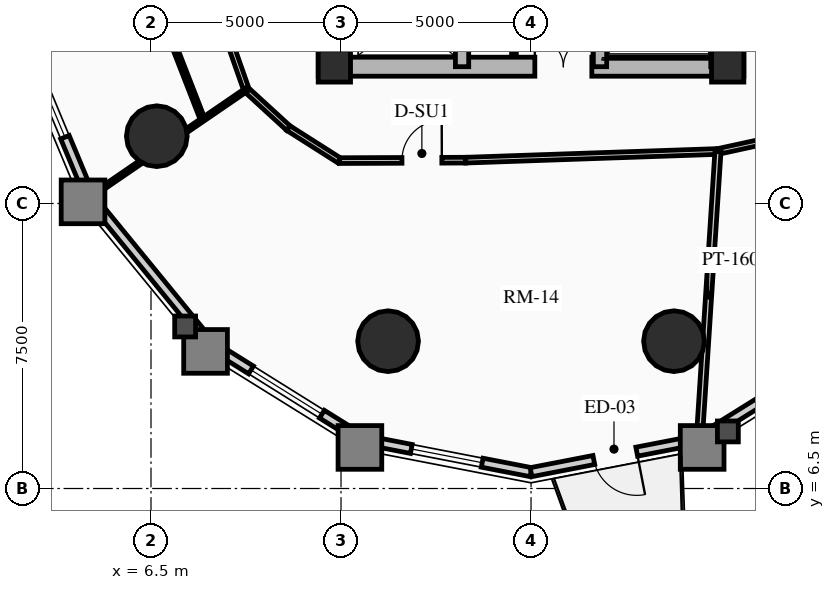
"""IFC4 building model, lengths in metres.
Left out: names, types, materials, properties, quantities, classifications, styles, units other than length and angle.
Written with IfcOpenShell. Run it as: python <this file> out.ifc"""

import sys

from ifc_helpers import new_model, si_unit, direction, frame, frame_2d, origin, origin_2d, place, context, subcontext, project, spatial, rectangle, circle, extrude, source, transform, mapped, element, fill, save


model = new_model("IFC4")
c1 = context("Model", 3, precision=1e-05, world=origin(), true_north=direction((0.0, 1.0)))
c2 = subcontext(c1, "Body", "Model", "MODEL_VIEW")
j1 = project(units=[si_unit("LENGTHUNIT", "METRE"), si_unit("PLANEANGLEUNIT", "RADIAN")], contexts=[c1])
p1 = place(None, origin())
s1 = spatial("IfcSite", under=j1, at=p1, CompositionType="ELEMENT")
p2 = place(p1, origin())
s2 = spatial("IfcBuilding", under=s1, at=p2, CompositionType="ELEMENT")
p3 = place(p2, frame((0.0, 0.0, 22.0)))
s3 = spatial("IfcBuildingStorey", under=s2, at=p3, CompositionType="ELEMENT", Elevation=22.0)
for number, where, z_axis, x_axis in (
    (1, (11.15, 17.35, 0.0), (0.0, 0.0, 1.0), (0.0, 1.0, 0.0)),
    (2, (21.85, 17.35, 0.0), (0.0, 0.0, 1.0), (0.0, 1.0, 0.0)),
):
    element("IfcWall", number, at=place(p3, frame(where, z_axis=z_axis, x_axis=x_axis)), inside=s3, PredefinedType="SHEAR", context=c2, shape_type="SweptSolid", body=[
        extrude(rectangle(XDim=14.3, YDim=0.5, at=frame_2d((7.15, 0.0))), origin(), (0.0, 0.0, 1.0), 2.91),
    ])
p4 = place(p3, frame((11.15, 17.6, 0.0), z_axis=(0.0, 0.0, 1.0), x_axis=(1.0, 0.0, 0.0)))
e3 = element("IfcWall", 3, at=p4, inside=s3, PredefinedType="SHEAR", context=c2, shape_type="SweptSolid", body=[
    extrude(rectangle(XDim=10.7, YDim=0.5, at=frame_2d((5.35, 0.0))), origin(), (0.0, 0.0, 1.0), 2.91),
])
m1 = source(origin(), c2, "Body", "SweptSolid", [
    extrude(rectangle(XDim=1.5, YDim=2.02, at=frame_2d((0.75, 1.01))), frame((0.0, 0.26, 0.0), z_axis=(0.0, -1.0, 0.0), x_axis=(1.0, 0.0, 0.0)), (0.0, 0.0, 1.0), 0.52),
])
p5 = place(p4, frame((5.45, 0.0, 0.0)))
e4 = element("IfcOpeningElement", 4, at=p5, cuts=e3, PredefinedType="OPENING", context=c2, shape_type="MappedRepresentation", body=[
    mapped(m1, transform((0.0, 0.0, 0.0), x_axis=(1.0, 0.0, 0.0), y_axis=(0.0, 1.0, 0.0), z_axis=(0.0, 0.0, 1.0), scale=1.0)),
])
p6 = place(p3, frame((14.685, 17.6, 0.0), z_axis=(0.0, 0.0, 1.0), x_axis=(0.0, 1.0, 0.0)))
e5 = element("IfcWall", 5, at=p6, inside=s3, PredefinedType="SHEAR", context=c2, shape_type="SweptSolid", body=[
    extrude(rectangle(XDim=13.8, YDim=0.35, at=frame_2d((6.9, 0.0))), origin(), (0.0, 0.0, 1.0), 2.91),
])
m2 = source(origin(), c2, "Body", "SweptSolid", [
    extrude(rectangle(XDim=1.1, YDim=2.015, at=frame_2d((0.55, 1.007))), frame((0.0, 0.185, 0.0), z_axis=(0.0, -1.0, 0.0), x_axis=(1.0, 0.0, 0.0)), (0.0, 0.0, 1.0), 0.37),
])
p7 = place(p6, frame((4.9, 0.0, 0.0)))
e6 = element("IfcOpeningElement", 6, at=p7, cuts=e5, PredefinedType="OPENING", context=c2, shape_type="MappedRepresentation", body=[
    mapped(m2, transform((0.0, 0.0, 0.0), x_axis=(1.0, 0.0, 0.0), y_axis=(0.0, 1.0, 0.0), z_axis=(0.0, 0.0, 1.0), scale=1.0)),
])
m3 = source(origin(), c2, "Body", "SweptSolid", [
    extrude(rectangle(XDim=1.15, YDim=2.02, at=frame_2d((0.575, 1.01))), frame((0.0, 0.185, 0.0), z_axis=(0.0, -1.0, 0.0), x_axis=(1.0, 0.0, 0.0)), (0.0, 0.0, 1.0), 0.37),
])
p8 = place(p6, frame((7.32, 0.0, 0.0)))
e7 = element("IfcOpeningElement", 7, at=p8, cuts=e5, PredefinedType="OPENING", context=c2, shape_type="MappedRepresentation", body=[
    mapped(m3, transform((0.0, 0.0, 0.0), x_axis=(1.0, 0.0, 0.0), y_axis=(0.0, 1.0, 0.0), z_axis=(0.0, 0.0, 1.0), scale=1.0)),
])
p9 = place(p3, frame((18.315, 17.6, 0.0), z_axis=(0.0, 0.0, 1.0), x_axis=(0.0, 1.0, 0.0)))
e8 = element("IfcWall", 8, at=p9, inside=s3, PredefinedType="SHEAR", context=c2, shape_type="SweptSolid", body=[
    extrude(rectangle(XDim=13.8, YDim=0.35, at=frame_2d((6.9, 0.0))), origin(), (0.0, 0.0, 1.0), 2.91),
])
p10 = place(p9, frame((10.025, 0.0, 0.0)))
e9 = element("IfcOpeningElement", 9, at=p10, cuts=e8, PredefinedType="OPENING", context=c2, shape_type="MappedRepresentation", body=[
    mapped(m2, transform((0.0, 0.0, 0.0), x_axis=(1.0, 0.0, 0.0), y_axis=(0.0, 1.0, 0.0), z_axis=(0.0, 0.0, 1.0), scale=1.0)),
])
p11 = place(p9, frame((12.025, 0.0, 0.0)))
e10 = element("IfcOpeningElement", 10, at=p11, cuts=e8, PredefinedType="OPENING", context=c2, shape_type="MappedRepresentation", body=[
    mapped(m2, transform((0.0, 0.0, 0.0), x_axis=(1.0, 0.0, 0.0), y_axis=(0.0, 1.0, 0.0), z_axis=(0.0, 0.0, 1.0), scale=1.0)),
])
p12 = place(p9, frame((5.33, 0.0, 0.0)))
e11 = element("IfcOpeningElement", 11, at=p12, cuts=e8, PredefinedType="OPENING", context=c2, shape_type="MappedRepresentation", body=[
    mapped(m3, transform((0.0, 0.0, 0.0), x_axis=(1.0, 0.0, 0.0), y_axis=(0.0, 1.0, 0.0), z_axis=(0.0, 0.0, 1.0), scale=1.0)),
])
p13 = place(p3, frame((21.405, 17.6, 0.0), z_axis=(0.0, 0.0, 1.0), x_axis=(0.0, 1.0, 0.0)))
e12 = element("IfcWall", 12, at=p13, inside=s3, PredefinedType="SHEAR", context=c2, shape_type="SweptSolid", body=[
    extrude(rectangle(XDim=6.745, YDim=0.35, at=frame_2d((3.373, 0.0))), origin(), (0.0, 0.0, 1.0), 2.91),
])
for number, where, z_axis, x_axis in (
    (13, (11.325, 17.62, 0.0), (0.0, 0.0, 1.0), (1.0, 0.0, 0.0)),
    (14, (21.675, 17.62, 0.0), (0.0, 0.0, 1.0), (1.0, 0.0, 0.0)),
):
    element("IfcColumn", number, at=place(p3, frame(where, z_axis=z_axis, x_axis=x_axis)), inside=s3, PredefinedType="COLUMN", context=c2, shape_type="SweptSolid", body=[
        extrude(rectangle(XDim=0.85, YDim=0.85, at=origin_2d()), origin(), (0.0, 0.0, 1.0), 2.91),
    ])
for number, where, z_axis, x_axis in (
    (15, (6.653, 15.771, 0.0), (0.0, 0.0, 1.0), (1.0, 0.0, 0.0)),
    (16, (12.739, 10.377, 0.0), (0.0, 0.0, 1.0), (1.0, 0.0, 0.0)),
    (17, (20.261, 10.377, 0.0), (0.0, 0.0, 1.0), (1.0, 0.0, 0.0)),
):
    element("IfcColumn", number, at=place(p3, frame(where, z_axis=z_axis, x_axis=x_axis)), inside=s3, PredefinedType="USERDEFINED", context=c2, shape_type="SweptSolid", body=[
        extrude(circle(Radius=0.8, at=origin_2d()), origin(), (0.0, 0.0, 1.0), 2.91),
    ])
p14 = place(p3, frame((4.89, 14.173, 0.0), z_axis=(0.0, 0.0, 1.0), x_axis=(-0.384255919668, 0.923226618009, 0.0)))
e18 = element("IfcWall", 18, at=p14, inside=s3, PredefinedType="SOLIDWALL", context=c2, shape_type="SweptSolid", body=[
    extrude(rectangle(XDim=5.305, YDim=0.24, at=frame_2d((2.653, 0.0))), origin(), (0.0, 0.0, 1.0), 2.073),
])
m4 = source(origin(), c2, "Body", "SweptSolid", [
    extrude(rectangle(XDim=1.9, YDim=1.35, at=frame_2d((0.95, 0.675))), frame((0.0, 0.13, 0.0), z_axis=(0.0, -1.0, 0.0), x_axis=(1.0, 0.0, 0.0)), (0.0, 0.0, 1.0), 0.26),
])
p15 = place(p14, frame((1.703, 0.0, 0.65)))
e19 = element("IfcOpeningElement", 19, at=p15, cuts=e18, PredefinedType="OPENING", context=c2, shape_type="MappedRepresentation", body=[
    mapped(m4, transform((0.0, 0.0, 0.0), x_axis=(1.0, 0.0, 0.0), y_axis=(0.0, 1.0, 0.0), z_axis=(0.0, 0.0, 1.0), scale=1.0)),
])
p16 = place(p3, frame((8.065, 10.286, 0.0), z_axis=(0.0, 0.0, 1.0), x_axis=(-0.632588557044, 0.774488035735, 0.0)))
e20 = element("IfcWall", 20, at=p16, inside=s3, PredefinedType="SOLIDWALL", context=c2, shape_type="SweptSolid", body=[
    extrude(rectangle(XDim=5.019, YDim=0.24, at=frame_2d((2.509, 0.0))), origin(), (0.0, 0.0, 1.0), 2.073),
])
p17 = place(p3, frame((12.065, 7.79, 0.0), z_axis=(0.0, 0.0, 1.0), x_axis=(-0.848422721916, 0.529319265601, 0.0)))
e21 = element("IfcWall", 21, at=p17, inside=s3, PredefinedType="SOLIDWALL", context=c2, shape_type="SweptSolid", body=[
    extrude(rectangle(XDim=4.715, YDim=0.24, at=frame_2d((2.357, 0.0))), origin(), (0.0, 0.0, 1.0), 2.073),
])
m5 = source(origin(), c2, "Body", "SweptSolid", [
    extrude(rectangle(XDim=2.2, YDim=1.35, at=frame_2d((1.1, 0.675))), frame((0.0, 0.13, 0.0), z_axis=(0.0, -1.0, 0.0), x_axis=(1.0, 0.0, 0.0)), (0.0, 0.0, 1.0), 0.26),
])
p18 = place(p17, frame((1.258, 0.0, 0.65)))
e22 = element("IfcOpeningElement", 22, at=p18, cuts=e21, PredefinedType="OPENING", context=c2, shape_type="MappedRepresentation", body=[
    mapped(m5, transform((0.0, 0.0, 0.0), x_axis=(1.0, 0.0, 0.0), y_axis=(0.0, 1.0, 0.0), z_axis=(0.0, 0.0, 1.0), scale=1.0)),
])
p19 = place(p3, frame((16.5, 6.93, 0.0), z_axis=(0.0, 0.0, 1.0), x_axis=(-0.981717351035, 0.190344536766, 0.0)))
e23 = element("IfcWall", 23, at=p19, inside=s3, PredefinedType="SOLIDWALL", context=c2, shape_type="SweptSolid", body=[
    extrude(rectangle(XDim=4.517, YDim=0.24, at=frame_2d((2.259, 0.0))), origin(), (0.0, 0.0, 1.0), 2.073),
])
p20 = place(p19, frame((1.309, 0.0, 0.65)))
e24 = element("IfcOpeningElement", 24, at=p20, cuts=e23, PredefinedType="OPENING", context=c2, shape_type="MappedRepresentation", body=[
    mapped(m4, transform((0.0, 0.0, 0.0), x_axis=(1.0, 0.0, 0.0), y_axis=(0.0, 1.0, 0.0), z_axis=(0.0, 0.0, 1.0), scale=1.0)),
])
p21 = place(p3, frame((20.935, 7.79, 0.0), z_axis=(0.0, 0.0, 1.0), x_axis=(-0.981717351035, -0.190344536766, 0.0)))
e25 = element("IfcWall", 25, at=p21, inside=s3, PredefinedType="SOLIDWALL", context=c2, shape_type="SweptSolid", body=[
    extrude(rectangle(XDim=4.517, YDim=0.24, at=frame_2d((2.259, 0.0))), origin(), (0.0, 0.0, 1.0), 2.073),
])
m6 = source(origin(), c2, "Body", "SweptSolid", [
    extrude(rectangle(XDim=1.15, YDim=2.005, at=frame_2d((0.575, 1.002))), frame((0.0, 0.13, 0.0), z_axis=(0.0, -1.0, 0.0), x_axis=(1.0, 0.0, 0.0)), (0.0, 0.0, 1.0), 0.26),
])
p22 = place(p21, frame((1.684, 0.0, 0.0)))
e26 = element("IfcOpeningElement", 26, at=p22, cuts=e25, PredefinedType="OPENING", context=c2, shape_type="MappedRepresentation", body=[
    mapped(m6, transform((0.0, 0.0, 0.0), x_axis=(1.0, 0.0, 0.0), y_axis=(0.0, 1.0, 0.0), z_axis=(0.0, 0.0, 1.0), scale=1.0)),
])
p23 = place(p3, frame((24.935, 10.286, 0.0), z_axis=(0.0, 0.0, 1.0), x_axis=(-0.848422721916, -0.529319265601, 0.0)))
e27 = element("IfcWall", 27, at=p23, inside=s3, PredefinedType="SOLIDWALL", context=c2, shape_type="SweptSolid", body=[
    extrude(rectangle(XDim=4.715, YDim=0.24, at=frame_2d((2.357, 0.0))), origin(), (0.0, 0.0, 1.0), 2.073),
])
p24 = place(p3, frame((16.05, 17.92, 0.0), z_axis=(0.0, 0.0, 1.0), x_axis=(0.0, 1.0, 0.0)))
e28 = element("IfcWall", 28, at=p24, inside=s3, PredefinedType="PARTITIONING", context=c2, shape_type="SweptSolid", body=[
    extrude(rectangle(XDim=1.8, YDim=0.125, at=frame_2d((0.9, 0.0))), origin(), (0.0, 0.0, 1.0), 2.635),
])
m7 = source(origin(), c2, "Body", "SweptSolid", [
    extrude(rectangle(XDim=0.9, YDim=2.005, at=frame_2d((0.45, 1.002))), frame((0.0, 0.073, 0.0), z_axis=(0.0, -1.0, 0.0), x_axis=(1.0, 0.0, 0.0)), (0.0, 0.0, 1.0), 0.145),
])
p25 = place(p24, frame((0.42, 0.0, 0.0)))
e29 = element("IfcOpeningElement", 29, at=p25, cuts=e28, PredefinedType="OPENING", context=c2, shape_type="MappedRepresentation", body=[
    mapped(m7, transform((0.0, 0.0, 0.0), x_axis=(1.0, 0.0, 0.0), y_axis=(0.0, 1.0, 0.0), z_axis=(0.0, 0.0, 1.0), scale=1.0)),
])
p26 = place(p3, frame((8.538, 18.338, 0.0), z_axis=(0.0, 0.0, 1.0), x_axis=(0.331358150167, -0.94350504838, 0.0)))
e30 = element("IfcWall", 30, at=p26, inside=s3, PredefinedType="PARTITIONING", context=c2, shape_type="SweptSolid", body=[
    extrude(rectangle(XDim=1.424, YDim=0.15, at=frame_2d((0.712, 0.0))), origin(), (0.0, 0.0, 1.0), 2.205),
])
p27 = place(p3, frame((9.01, 16.994, 0.0), z_axis=(0.0, 0.0, 1.0), x_axis=(0.737701798986, -0.67512669609, 0.0)))
e31 = element("IfcWall", 31, at=p27, inside=s3, PredefinedType="PARTITIONING", context=c2, shape_type="SweptSolid", body=[
    extrude(rectangle(XDim=1.498, YDim=0.15, at=frame_2d((0.749, 0.0))), origin(), (0.0, 0.0, 1.0), 2.159),
])
p28 = place(p3, frame((10.115, 15.983, 0.0), z_axis=(0.0, 0.0, 1.0), x_axis=(0.843995849351, -0.536349705209, 0.0)))
e32 = element("IfcWall", 32, at=p28, inside=s3, PredefinedType="PARTITIONING", context=c2, shape_type="SweptSolid", body=[
    extrude(rectangle(XDim=1.593, YDim=0.15, at=frame_2d((0.796, 0.0))), origin(), (0.0, 0.0, 1.0), 2.205),
])
p29 = place(p3, frame((11.46, 15.129, 0.0), z_axis=(0.0, 0.0, 1.0), x_axis=(0.999993513287, 0.003601858435, 0.0)))
e33 = element("IfcWall", 33, at=p29, inside=s3, PredefinedType="PARTITIONING", context=c2, shape_type="SweptSolid", body=[
    extrude(rectangle(XDim=3.321, YDim=0.15, at=frame_2d((1.661, 0.0))), origin(), (0.0, 0.0, 1.0), 2.159),
])
m8 = source(origin(), c2, "Body", "SweptSolid", [
    extrude(rectangle(XDim=1.05, YDim=2.015, at=frame_2d((0.525, 1.007))), frame((0.0, 0.085, 0.0), z_axis=(0.0, -1.0, 0.0), x_axis=(1.0, 0.0, 0.0)), (0.0, 0.0, 1.0), 0.17),
])
p30 = place(p29, frame((1.643, 0.0, 0.0)))
e34 = element("IfcOpeningElement", 34, at=p30, cuts=e33, PredefinedType="OPENING", context=c2, shape_type="MappedRepresentation", body=[
    mapped(m8, transform((0.0, 0.0, 0.0), x_axis=(1.0, 0.0, 0.0), y_axis=(0.0, 1.0, 0.0), z_axis=(0.0, 0.0, 1.0), scale=1.0)),
])
p31 = place(p3, frame((14.781, 15.141, 0.0), z_axis=(0.0, 0.0, 1.0), x_axis=(0.999407918707, 0.034406569513, 0.0)))
e35 = element("IfcWall", 35, at=p31, inside=s3, PredefinedType="PARTITIONING", context=c2, shape_type="SweptSolid", body=[
    extrude(rectangle(XDim=6.642, YDim=0.15, at=frame_2d((3.321, 0.0))), origin(), (0.0, 0.0, 1.0), 2.159),
])
p32 = place(p3, frame((21.419, 15.369, 0.0), z_axis=(0.0, 0.0, 1.0), x_axis=(0.977192701953, 0.212354475464, 0.0)))
e36 = element("IfcWall", 36, at=p32, inside=s3, PredefinedType="PARTITIONING", context=c2, shape_type="SweptSolid", body=[
    extrude(rectangle(XDim=1.888, YDim=0.15, at=frame_2d((0.944, 0.0))), origin(), (0.0, 0.0, 1.0), 2.205),
])
p33 = place(p3, frame((9.01, 16.994, 0.0), z_axis=(0.0, 0.0, 1.0), x_axis=(-0.825130244962, -0.564942544733, 0.0)))
e37 = element("IfcWall", 37, at=p33, inside=s3, PredefinedType="MOVABLE", context=c2, shape_type="SweptSolid", body=[
    extrude(rectangle(XDim=4.974, YDim=0.1, at=frame_2d((2.487, 0.0))), origin(), (0.0, 0.0, 1.0), 2.073),
])
p34 = place(p3, frame((21.419, 15.369, 0.0), z_axis=(0.0, 0.0, 1.0), x_axis=(-0.064709408161, -0.997904149954, 0.0)))
e38 = element("IfcWall", 38, at=p34, inside=s3, PredefinedType="PARTITIONING", context=c2, shape_type="SweptSolid", body=[
    extrude(rectangle(XDim=7.576, YDim=0.16, at=frame_2d((3.788, 0.0))), origin(), (0.0, 0.0, 1.0), 2.073),
])
p35 = place(p3, frame((6.951, 18.545, 0.0), z_axis=(0.0, 0.0, 1.0), x_axis=(0.362681113276, -0.931913306093, 0.0)))
e39 = element("IfcWall", 39, at=p35, inside=s3, PredefinedType="PARTITIONING", context=c2, shape_type="SweptSolid", body=[
    extrude(rectangle(XDim=2.508, YDim=0.125, at=frame_2d((1.254, 0.0))), origin(), (0.0, 0.0, 1.0), 2.159),
])
m9 = source(origin(), c2, "Body", "SweptSolid", [
    extrude(rectangle(XDim=1.9, YDim=1.35, at=frame_2d((0.95, 0.675))), frame((0.0, 0.03, 0.0), z_axis=(0.0, -1.0, 0.0), x_axis=(1.0, 0.0, 0.0)), (0.0, 0.0, 1.0), 0.06),
])
p36 = place(p15, origin())
e40 = element("IfcWindow", 40, at=p36, inside=s3, PartitioningType="DOUBLE_PANEL_VERTICAL", PredefinedType="WINDOW", context=c2, shape_type="MappedRepresentation", body=[
    mapped(m9, transform((0.0, 0.0, 0.0), x_axis=(1.0, 0.0, 0.0), y_axis=(0.0, 1.0, 0.0), z_axis=(0.0, 0.0, 1.0), scale=1.0)),
])
fill(e19, e40)
m10 = source(origin(), c2, "Body", "SweptSolid", [
    extrude(rectangle(XDim=2.2, YDim=1.35, at=frame_2d((1.1, 0.675))), frame((0.0, 0.03, 0.0), z_axis=(0.0, -1.0, 0.0), x_axis=(1.0, 0.0, 0.0)), (0.0, 0.0, 1.0), 0.06),
])
p37 = place(p18, origin())
e41 = element("IfcWindow", 41, at=p37, inside=s3, PartitioningType="DOUBLE_PANEL_VERTICAL", PredefinedType="WINDOW", context=c2, shape_type="MappedRepresentation", body=[
    mapped(m10, transform((0.0, 0.0, 0.0), x_axis=(1.0, 0.0, 0.0), y_axis=(0.0, 1.0, 0.0), z_axis=(0.0, 0.0, 1.0), scale=1.0)),
])
fill(e22, e41)
p38 = place(p20, origin())
e42 = element("IfcWindow", 42, at=p38, inside=s3, PartitioningType="DOUBLE_PANEL_VERTICAL", PredefinedType="WINDOW", context=c2, shape_type="MappedRepresentation", body=[
    mapped(m9, transform((0.0, 0.0, 0.0), x_axis=(1.0, 0.0, 0.0), y_axis=(0.0, 1.0, 0.0), z_axis=(0.0, 0.0, 1.0), scale=1.0)),
])
fill(e24, e42)
m11 = source(origin(), c2, "Body", "SweptSolid", [
    extrude(rectangle(XDim=1.15, YDim=2.005, at=frame_2d((0.575, 1.002))), frame((0.0, 0.025, 0.0), z_axis=(0.0, -1.0, 0.0), x_axis=(1.0, 0.0, 0.0)), (0.0, 0.0, 1.0), 0.05),
])
p39 = place(p22, origin())
e43 = element("IfcDoor", 43, at=p39, inside=s3, OperationType="SINGLE_SWING_LEFT", PredefinedType="DOOR", context=c2, shape_type="MappedRepresentation", body=[
    mapped(m11, transform((0.0, 0.0, 0.0), x_axis=(1.0, 0.0, 0.0), y_axis=(0.0, 1.0, 0.0), z_axis=(0.0, 0.0, 1.0), scale=1.0)),
])
fill(e26, e43)
m12 = source(origin(), c2, "Body", "SweptSolid", [
    extrude(rectangle(XDim=1.5, YDim=2.02, at=frame_2d((0.75, 1.01))), frame((0.0, 0.025, 0.0), z_axis=(0.0, -1.0, 0.0), x_axis=(1.0, 0.0, 0.0)), (0.0, 0.0, 1.0), 0.05),
])
p40 = place(p5, origin())
e44 = element("IfcDoor", 44, at=p40, inside=s3, OperationType="DOUBLE_DOOR_SINGLE_SWING", PredefinedType="DOOR", context=c2, shape_type="MappedRepresentation", body=[
    mapped(m12, transform((0.0, 0.0, 0.0), x_axis=(1.0, 0.0, 0.0), y_axis=(0.0, 1.0, 0.0), z_axis=(0.0, 0.0, 1.0), scale=1.0)),
])
fill(e4, e44)
m13 = source(origin(), c2, "Body", "SweptSolid", [
    extrude(rectangle(XDim=1.05, YDim=2.015, at=frame_2d((0.525, 1.007))), frame((0.0, 0.025, 0.0), z_axis=(0.0, -1.0, 0.0), x_axis=(1.0, 0.0, 0.0)), (0.0, 0.0, 1.0), 0.05),
])
p41 = place(p30, origin())
e45 = element("IfcDoor", 45, at=p41, inside=s3, OperationType="SINGLE_SWING_RIGHT", PredefinedType="DOOR", context=c2, shape_type="MappedRepresentation", body=[
    mapped(m13, transform((0.0, 0.0, 0.0), x_axis=(1.0, 0.0, 0.0), y_axis=(0.0, 1.0, 0.0), z_axis=(0.0, 0.0, 1.0), scale=1.0)),
])
fill(e34, e45)
save(model, sys.argv[1])
